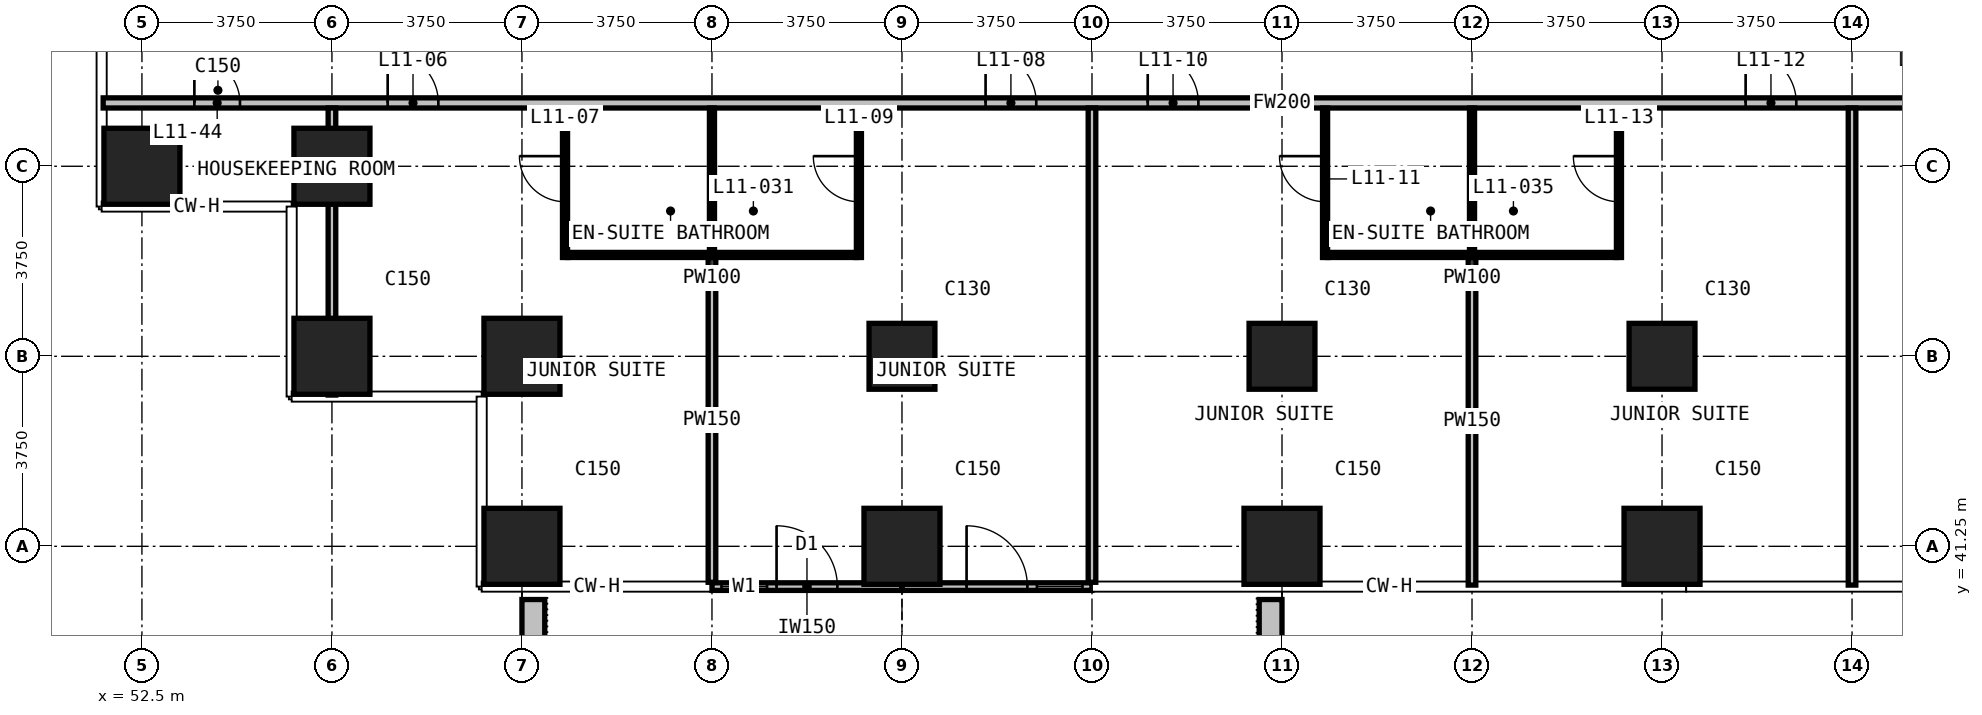
"""IFC4 building model, lengths in metres.
Left out: names, types, materials, properties, quantities, classifications, styles, units other than length and angle.
Written with IfcOpenShell. Run it as: python <this file> out.ifc"""

import sys

from ifc_helpers import new_model, si_unit, direction, frame, frame_2d, origin, origin_2d, place, context, subcontext, project, spatial, rectangle, extrude, element, fill, save


model = new_model("IFC4")
c1 = context("Model", 3, precision=1e-05, world=origin(), true_north=direction((0.0, 1.0)))
c2 = subcontext(c1, "Body", "Model", "MODEL_VIEW")
j1 = project(units=[si_unit("LENGTHUNIT", "METRE"), si_unit("PLANEANGLEUNIT", "RADIAN")], contexts=[c1])
p1 = place(None, origin())
s1 = spatial("IfcSite", under=j1, at=p1, CompositionType="ELEMENT")
p2 = place(p1, origin())
s2 = spatial("IfcBuilding", under=s1, at=p2, CompositionType="ELEMENT")
p3 = place(p2, frame((0.0, 0.0, 56.0)))
s3 = spatial("IfcBuildingStorey", under=s2, at=p3, CompositionType="ELEMENT", Elevation=56.0)
for number, where, z_axis, x_axis in (
    (1, (52.5, 48.75, 0.0), (0.0, 0.0, 1.0), (1.0, 0.0, 0.0)),
    (2, (56.25, 45.0, 0.0), (0.0, 0.0, 1.0), (1.0, 0.0, 0.0)),
    (3, (56.25, 48.75, 0.0), (0.0, 0.0, 1.0), (1.0, 0.0, 0.0)),
    (4, (60.0, 41.25, 0.0), (0.0, 0.0, 1.0), (1.0, 0.0, 0.0)),
    (5, (60.0, 45.0, 0.0), (0.0, 0.0, 1.0), (1.0, 0.0, 0.0)),
    (6, (67.5, 41.25, 0.0), (0.0, 0.0, 1.0), (1.0, 0.0, 0.0)),
):
    element("IfcColumn", number, at=place(p3, frame(where, z_axis=z_axis, x_axis=x_axis)), inside=s3, PredefinedType="COLUMN", context=c2, shape_type="SweptSolid", body=[
        extrude(rectangle(XDim=1.5, YDim=1.5, at=origin_2d()), origin(), (0.0, 0.0, 1.0), 3.3),
    ])
p4 = place(p3, frame((67.5, 45.0, 0.0), z_axis=(0.0, 0.0, 1.0), x_axis=(1.0, 0.0, 0.0)))
e7 = element("IfcColumn", 7, at=p4, inside=s3, PredefinedType="COLUMN", context=c2, shape_type="SweptSolid", body=[
    extrude(rectangle(XDim=1.3, YDim=1.3, at=origin_2d()), origin(), (0.0, 0.0, 1.0), 3.3),
])
p5 = place(p3, frame((75.0, 41.25, 0.0), z_axis=(0.0, 0.0, 1.0), x_axis=(1.0, 0.0, 0.0)))
e8 = element("IfcColumn", 8, at=p5, inside=s3, PredefinedType="COLUMN", context=c2, shape_type="SweptSolid", body=[
    extrude(rectangle(XDim=1.5, YDim=1.5, at=origin_2d()), origin(), (0.0, 0.0, 1.0), 3.3),
])
p6 = place(p3, frame((75.0, 45.0, 0.0), z_axis=(0.0, 0.0, 1.0), x_axis=(1.0, 0.0, 0.0)))
e9 = element("IfcColumn", 9, at=p6, inside=s3, PredefinedType="COLUMN", context=c2, shape_type="SweptSolid", body=[
    extrude(rectangle(XDim=1.3, YDim=1.3, at=origin_2d()), origin(), (0.0, 0.0, 1.0), 3.3),
])
p7 = place(p3, frame((82.5, 41.25, 0.0), z_axis=(0.0, 0.0, 1.0), x_axis=(1.0, 0.0, 0.0)))
e10 = element("IfcColumn", 10, at=p7, inside=s3, PredefinedType="COLUMN", context=c2, shape_type="SweptSolid", body=[
    extrude(rectangle(XDim=1.5, YDim=1.5, at=origin_2d()), origin(), (0.0, 0.0, 1.0), 3.3),
])
p8 = place(p3, frame((82.5, 45.0, 0.0), z_axis=(0.0, 0.0, 1.0), x_axis=(1.0, 0.0, 0.0)))
e11 = element("IfcColumn", 11, at=p8, inside=s3, PredefinedType="COLUMN", context=c2, shape_type="SweptSolid", body=[
    extrude(rectangle(XDim=1.3, YDim=1.3, at=origin_2d()), origin(), (0.0, 0.0, 1.0), 3.3),
])
p9 = place(p3, frame((63.75, 40.455, 0.0), z_axis=(0.0, 0.0, 1.0), x_axis=(1.0, 0.0, 0.0)))
e12 = element("IfcWall", 12, at=p9, inside=s3, PredefinedType="SOLIDWALL", context=c2, shape_type="SweptSolid", body=[
    extrude(rectangle(XDim=3.75, YDim=0.15, at=frame_2d((1.875, 0.0))), origin(), (0.0, 0.0, 1.0), 3.0),
])
p10 = place(p9, frame((0.188, 0.0, 0.1)))
e13 = element("IfcOpeningElement", 13, at=p10, cuts=e12, PredefinedType="OPENING", context=c2, shape_type="SweptSolid", body=[
    extrude(rectangle(XDim=0.9, YDim=2.4, at=frame_2d((0.45, 1.2))), frame((0.0, 0.085, 0.0), z_axis=(0.0, -1.0, 0.0), x_axis=(1.0, 0.0, 0.0)), (0.0, 0.0, 1.0), 0.17),
])
p11 = place(p9, frame((1.275, 0.0, 0.0)))
e14 = element("IfcOpeningElement", 14, at=p11, cuts=e12, PredefinedType="OPENING", context=c2, shape_type="SweptSolid", body=[
    extrude(rectangle(XDim=1.2, YDim=2.4, at=frame_2d((0.6, 1.2))), frame((0.0, 0.085, 0.0), z_axis=(0.0, -1.0, 0.0), x_axis=(1.0, 0.0, 0.0)), (0.0, 0.0, 1.0), 0.17),
])
p12 = place(p3, frame((67.5, 40.455, 0.0), z_axis=(0.0, 0.0, 1.0), x_axis=(1.0, 0.0, 0.0)))
e15 = element("IfcWall", 15, at=p12, inside=s3, PredefinedType="SOLIDWALL", context=c2, shape_type="SweptSolid", body=[
    extrude(rectangle(XDim=3.75, YDim=0.15, at=frame_2d((1.875, 0.0))), origin(), (0.0, 0.0, 1.0), 3.0),
])
p13 = place(p12, frame((1.275, 0.0, 0.0)))
e16 = element("IfcOpeningElement", 16, at=p13, cuts=e15, PredefinedType="OPENING", context=c2, shape_type="SweptSolid", body=[
    extrude(rectangle(XDim=1.2, YDim=2.4, at=frame_2d((0.6, 1.2))), frame((0.0, 0.085, 0.0), z_axis=(0.0, -1.0, 0.0), x_axis=(1.0, 0.0, 0.0)), (0.0, 0.0, 1.0), 0.17),
])
p14 = place(p12, frame((2.663, 0.0, 0.1)))
e17 = element("IfcOpeningElement", 17, at=p14, cuts=e15, PredefinedType="OPENING", context=c2, shape_type="SweptSolid", body=[
    extrude(rectangle(XDim=0.9, YDim=2.4, at=frame_2d((0.45, 1.2))), frame((0.0, 0.085, 0.0), z_axis=(0.0, -1.0, 0.0), x_axis=(1.0, 0.0, 0.0)), (0.0, 0.0, 1.0), 0.17),
])
for number, where, z_axis, x_axis in (
    (18, (60.225, 40.2, 0.0), (0.0, 0.0, 1.0), (0.0, -1.0, 0.0)),
    (19, (74.775, 40.2, 0.0), (0.0, 0.0, 1.0), (0.0, -1.0, 0.0)),
):
    element("IfcWall", number, at=place(p3, frame(where, z_axis=z_axis, x_axis=x_axis)), inside=s3, PredefinedType="USERDEFINED", context=c2, shape_type="SweptSolid", body=[
        extrude(rectangle(XDim=2.35, YDim=0.45, at=frame_2d((1.175, 0.0))), origin(), (0.0, 0.0, 1.0), 1.1),
    ])
p15 = place(p3, frame((51.735, 50.0, 0.0), z_axis=(0.0, 0.0, 1.0), x_axis=(1.0, 0.0, 0.0)))
e20 = element("IfcWall", 20, at=p15, inside=s3, PredefinedType="PARTITIONING", context=c2, shape_type="SweptSolid", body=[
    extrude(rectangle(XDim=46.53, YDim=0.2, at=frame_2d((23.265, 0.0))), origin(), (0.0, 0.0, 1.0), 3.0),
])
p16 = place(p15, frame((5.615, 0.0, 0.0)))
e21 = element("IfcOpeningElement", 21, at=p16, cuts=e20, PredefinedType="OPENING", context=c2, shape_type="SweptSolid", body=[
    extrude(rectangle(XDim=1.0, YDim=2.2, at=frame_2d((0.5, 1.1))), frame((0.0, 0.11, 0.0), z_axis=(0.0, -1.0, 0.0), x_axis=(1.0, 0.0, 0.0)), (0.0, 0.0, 1.0), 0.22),
])
p17 = place(p15, frame((17.415, 0.0, 0.0)))
e22 = element("IfcOpeningElement", 22, at=p17, cuts=e20, PredefinedType="OPENING", context=c2, shape_type="SweptSolid", body=[
    extrude(rectangle(XDim=1.0, YDim=2.2, at=frame_2d((0.5, 1.1))), frame((0.0, 0.11, 0.0), z_axis=(0.0, -1.0, 0.0), x_axis=(1.0, 0.0, 0.0)), (0.0, 0.0, 1.0), 0.22),
])
p18 = place(p15, frame((20.615, 0.0, 0.0)))
e23 = element("IfcOpeningElement", 23, at=p18, cuts=e20, PredefinedType="OPENING", context=c2, shape_type="SweptSolid", body=[
    extrude(rectangle(XDim=1.0, YDim=2.2, at=frame_2d((0.5, 1.1))), frame((0.0, 0.11, 0.0), z_axis=(0.0, -1.0, 0.0), x_axis=(1.0, 0.0, 0.0)), (0.0, 0.0, 1.0), 0.22),
])
p19 = place(p15, frame((32.415, 0.0, 0.0)))
e24 = element("IfcOpeningElement", 24, at=p19, cuts=e20, PredefinedType="OPENING", context=c2, shape_type="SweptSolid", body=[
    extrude(rectangle(XDim=1.0, YDim=2.2, at=frame_2d((0.5, 1.1))), frame((0.0, 0.11, 0.0), z_axis=(0.0, -1.0, 0.0), x_axis=(1.0, 0.0, 0.0)), (0.0, 0.0, 1.0), 0.22),
])
p20 = place(p15, frame((35.615, 0.0, 0.0)))
e25 = element("IfcOpeningElement", 25, at=p20, cuts=e20, PredefinedType="OPENING", context=c2, shape_type="SweptSolid", body=[
    extrude(rectangle(XDim=1.0, YDim=2.2, at=frame_2d((0.5, 1.1))), frame((0.0, 0.11, 0.0), z_axis=(0.0, -1.0, 0.0), x_axis=(1.0, 0.0, 0.0)), (0.0, 0.0, 1.0), 0.22),
])
p21 = place(p15, frame((1.8, 0.0, 0.0)))
e26 = element("IfcOpeningElement", 26, at=p21, cuts=e20, PredefinedType="OPENING", context=c2, shape_type="SweptSolid", body=[
    extrude(rectangle(XDim=0.9, YDim=2.2, at=frame_2d((0.45, 1.1))), frame((0.0, 0.11, 0.0), z_axis=(0.0, -1.0, 0.0), x_axis=(1.0, 0.0, 0.0)), (0.0, 0.0, 1.0), 0.22),
])
p22 = place(p15, frame((43.815, 0.0, 0.0)))
e27 = element("IfcOpeningElement", 27, at=p22, cuts=e20, PredefinedType="OPENING", context=c2, shape_type="SweptSolid", body=[
    extrude(rectangle(XDim=0.9, YDim=2.2, at=frame_2d((0.45, 1.1))), frame((0.0, 0.11, 0.0), z_axis=(0.0, -1.0, 0.0), x_axis=(1.0, 0.0, 0.0)), (0.0, 0.0, 1.0), 0.22),
])
p23 = place(p3, frame((56.25, 44.235, 0.0), z_axis=(0.0, 0.0, 1.0), x_axis=(0.0, 1.0, 0.0)))
e28 = element("IfcWall", 28, at=p23, inside=s3, PredefinedType="PARTITIONING", context=c2, shape_type="SweptSolid", body=[
    extrude(rectangle(XDim=5.665, YDim=0.15, at=frame_2d((2.833, 0.0))), origin(), (0.0, 0.0, 1.0), 3.0),
])
p24 = place(p3, frame((63.75, 40.54, 0.0), z_axis=(0.0, 0.0, 1.0), x_axis=(0.0, 1.0, 0.0)))
e29 = element("IfcWall", 29, at=p24, inside=s3, PredefinedType="PARTITIONING", context=c2, shape_type="SweptSolid", body=[
    extrude(rectangle(XDim=6.41, YDim=0.15, at=frame_2d((3.205, 0.0))), origin(), (0.0, 0.0, 1.0), 3.0),
])
p25 = place(p3, frame((71.25, 40.54, 0.0), z_axis=(0.0, 0.0, 1.0), x_axis=(0.0, 1.0, 0.0)))
e30 = element("IfcWall", 30, at=p25, inside=s3, PredefinedType="PARTITIONING", context=c2, shape_type="SweptSolid", body=[
    extrude(rectangle(XDim=9.36, YDim=0.15, at=frame_2d((4.68, 0.0))), origin(), (0.0, 0.0, 1.0), 3.0),
])
p26 = place(p3, frame((78.75, 40.485, 0.0), z_axis=(0.0, 0.0, 1.0), x_axis=(0.0, 1.0, 0.0)))
e31 = element("IfcWall", 31, at=p26, inside=s3, PredefinedType="PARTITIONING", context=c2, shape_type="SweptSolid", body=[
    extrude(rectangle(XDim=6.465, YDim=0.15, at=frame_2d((3.232, 0.0))), origin(), (0.0, 0.0, 1.0), 3.0),
])
p27 = place(p3, frame((86.25, 40.485, 0.0), z_axis=(0.0, 0.0, 1.0), x_axis=(0.0, 1.0, 0.0)))
e32 = element("IfcWall", 32, at=p27, inside=s3, PredefinedType="PARTITIONING", context=c2, shape_type="SweptSolid", body=[
    extrude(rectangle(XDim=9.415, YDim=0.15, at=frame_2d((4.708, 0.0))), origin(), (0.0, 0.0, 1.0), 3.0),
])
for number, where, z_axis, x_axis in (
    (33, (60.9, 47.0, 0.0), (0.0, 0.0, 1.0), (1.0, 0.0, 0.0)),
    (34, (75.9, 47.0, 0.0), (0.0, 0.0, 1.0), (1.0, 0.0, 0.0)),
):
    element("IfcWall", number, at=place(p3, frame(where, z_axis=z_axis, x_axis=x_axis)), inside=s3, PredefinedType="PARTITIONING", context=c2, shape_type="SweptSolid", body=[
        extrude(rectangle(XDim=5.7, YDim=0.1, at=frame_2d((2.85, 0.0))), origin(), (0.0, 0.0, 1.0), 3.0),
    ])
p28 = place(p3, frame((60.85, 46.95, 0.0), z_axis=(0.0, 0.0, 1.0), x_axis=(0.0, 1.0, 0.0)))
e35 = element("IfcWall", 35, at=p28, inside=s3, PredefinedType="PARTITIONING", context=c2, shape_type="SweptSolid", body=[
    extrude(rectangle(XDim=2.95, YDim=0.1, at=frame_2d((1.475, 0.0))), origin(), (0.0, 0.0, 1.0), 3.0),
])
p29 = place(p28, frame((1.1, 0.0, 0.0)))
e36 = element("IfcOpeningElement", 36, at=p29, cuts=e35, PredefinedType="OPENING", context=c2, shape_type="SweptSolid", body=[
    extrude(rectangle(XDim=0.9, YDim=2.2, at=frame_2d((0.45, 1.1))), frame((0.0, 0.06, 0.0), z_axis=(0.0, -1.0, 0.0), x_axis=(1.0, 0.0, 0.0)), (0.0, 0.0, 1.0), 0.12),
])
p30 = place(p3, frame((63.75, 47.05, 0.0), z_axis=(0.0, 0.0, 1.0), x_axis=(0.0, 1.0, 0.0)))
e37 = element("IfcWall", 37, at=p30, inside=s3, PredefinedType="PARTITIONING", context=c2, shape_type="SweptSolid", body=[
    extrude(rectangle(XDim=2.85, YDim=0.1, at=frame_2d((1.425, 0.0))), origin(), (0.0, 0.0, 1.0), 3.0),
])
p31 = place(p3, frame((66.65, 46.95, 0.0), z_axis=(0.0, 0.0, 1.0), x_axis=(0.0, 1.0, 0.0)))
e38 = element("IfcWall", 38, at=p31, inside=s3, PredefinedType="PARTITIONING", context=c2, shape_type="SweptSolid", body=[
    extrude(rectangle(XDim=2.95, YDim=0.1, at=frame_2d((1.475, 0.0))), origin(), (0.0, 0.0, 1.0), 3.0),
])
p32 = place(p31, frame((1.1, 0.0, 0.0)))
e39 = element("IfcOpeningElement", 39, at=p32, cuts=e38, PredefinedType="OPENING", context=c2, shape_type="SweptSolid", body=[
    extrude(rectangle(XDim=0.9, YDim=2.2, at=frame_2d((0.45, 1.1))), frame((0.0, 0.06, 0.0), z_axis=(0.0, -1.0, 0.0), x_axis=(1.0, 0.0, 0.0)), (0.0, 0.0, 1.0), 0.12),
])
p33 = place(p3, frame((75.85, 46.95, 0.0), z_axis=(0.0, 0.0, 1.0), x_axis=(0.0, 1.0, 0.0)))
e40 = element("IfcWall", 40, at=p33, inside=s3, PredefinedType="PARTITIONING", context=c2, shape_type="SweptSolid", body=[
    extrude(rectangle(XDim=2.95, YDim=0.1, at=frame_2d((1.475, 0.0))), origin(), (0.0, 0.0, 1.0), 3.0),
])
p34 = place(p33, frame((1.1, 0.0, 0.0)))
e41 = element("IfcOpeningElement", 41, at=p34, cuts=e40, PredefinedType="OPENING", context=c2, shape_type="SweptSolid", body=[
    extrude(rectangle(XDim=0.9, YDim=2.2, at=frame_2d((0.45, 1.1))), frame((0.0, 0.06, 0.0), z_axis=(0.0, -1.0, 0.0), x_axis=(1.0, 0.0, 0.0)), (0.0, 0.0, 1.0), 0.12),
])
p35 = place(p3, frame((78.75, 47.05, 0.0), z_axis=(0.0, 0.0, 1.0), x_axis=(0.0, 1.0, 0.0)))
e42 = element("IfcWall", 42, at=p35, inside=s3, PredefinedType="PARTITIONING", context=c2, shape_type="SweptSolid", body=[
    extrude(rectangle(XDim=2.85, YDim=0.1, at=frame_2d((1.425, 0.0))), origin(), (0.0, 0.0, 1.0), 3.0),
])
p36 = place(p3, frame((81.65, 46.95, 0.0), z_axis=(0.0, 0.0, 1.0), x_axis=(0.0, 1.0, 0.0)))
e43 = element("IfcWall", 43, at=p36, inside=s3, PredefinedType="PARTITIONING", context=c2, shape_type="SweptSolid", body=[
    extrude(rectangle(XDim=2.95, YDim=0.1, at=frame_2d((1.475, 0.0))), origin(), (0.0, 0.0, 1.0), 3.0),
])
p37 = place(p36, frame((1.1, 0.0, 0.0)))
e44 = element("IfcOpeningElement", 44, at=p37, cuts=e43, PredefinedType="OPENING", context=c2, shape_type="SweptSolid", body=[
    extrude(rectangle(XDim=0.9, YDim=2.2, at=frame_2d((0.45, 1.1))), frame((0.0, 0.06, 0.0), z_axis=(0.0, -1.0, 0.0), x_axis=(1.0, 0.0, 0.0)), (0.0, 0.0, 1.0), 0.12),
])
p38 = place(p10, origin())
e45 = element("IfcWindow", 45, at=p38, inside=s3, PartitioningType="SINGLE_PANEL", PredefinedType="WINDOW", context=c2, shape_type="SweptSolid", body=[
    extrude(rectangle(XDim=0.9, YDim=2.4, at=frame_2d((0.45, 1.2))), frame((0.0, 0.03, 0.0), z_axis=(0.0, -1.0, 0.0), x_axis=(1.0, 0.0, 0.0)), (0.0, 0.0, 1.0), 0.06),
])
fill(e13, e45)
p39 = place(p11, origin())
e46 = element("IfcDoor", 46, at=p39, inside=s3, OperationType="SINGLE_SWING_LEFT", PredefinedType="DOOR", context=c2, shape_type="SweptSolid", body=[
    extrude(rectangle(XDim=1.2, YDim=2.4, at=frame_2d((0.6, 1.2))), frame((0.0, 0.025, 0.0), z_axis=(0.0, -1.0, 0.0), x_axis=(1.0, 0.0, 0.0)), (0.0, 0.0, 1.0), 0.05),
])
fill(e14, e46)
p40 = place(p13, origin())
e47 = element("IfcDoor", 47, at=p40, inside=s3, OperationType="SINGLE_SWING_LEFT", PredefinedType="DOOR", context=c2, shape_type="SweptSolid", body=[
    extrude(rectangle(XDim=1.2, YDim=2.4, at=frame_2d((0.6, 1.2))), frame((0.0, 0.025, 0.0), z_axis=(0.0, -1.0, 0.0), x_axis=(1.0, 0.0, 0.0)), (0.0, 0.0, 1.0), 0.05),
])
fill(e16, e47)
p41 = place(p14, origin())
e48 = element("IfcWindow", 48, at=p41, inside=s3, PartitioningType="SINGLE_PANEL", PredefinedType="WINDOW", context=c2, shape_type="SweptSolid", body=[
    extrude(rectangle(XDim=0.9, YDim=2.4, at=frame_2d((0.45, 1.2))), frame((0.0, 0.03, 0.0), z_axis=(0.0, -1.0, 0.0), x_axis=(1.0, 0.0, 0.0)), (0.0, 0.0, 1.0), 0.06),
])
fill(e17, e48)
p42 = place(p16, origin())
e49 = element("IfcDoor", 49, at=p42, inside=s3, OperationType="SINGLE_SWING_LEFT", PredefinedType="DOOR", context=c2, shape_type="SweptSolid", body=[
    extrude(rectangle(XDim=1.0, YDim=2.2, at=frame_2d((0.5, 1.1))), frame((0.0, 0.025, 0.0), z_axis=(0.0, -1.0, 0.0), x_axis=(1.0, 0.0, 0.0)), (0.0, 0.0, 1.0), 0.05),
])
fill(e21, e49)
p43 = place(p29, origin())
e50 = element("IfcDoor", 50, at=p43, inside=s3, OperationType="SINGLE_SWING_RIGHT", PredefinedType="DOOR", context=c2, shape_type="SweptSolid", body=[
    extrude(rectangle(XDim=0.9, YDim=2.2, at=frame_2d((0.45, 1.1))), frame((0.0, 0.025, 0.0), z_axis=(0.0, -1.0, 0.0), x_axis=(1.0, 0.0, 0.0)), (0.0, 0.0, 1.0), 0.05),
])
fill(e36, e50)
p44 = place(p17, origin())
e51 = element("IfcDoor", 51, at=p44, inside=s3, OperationType="SINGLE_SWING_LEFT", PredefinedType="DOOR", context=c2, shape_type="SweptSolid", body=[
    extrude(rectangle(XDim=1.0, YDim=2.2, at=frame_2d((0.5, 1.1))), frame((0.0, 0.025, 0.0), z_axis=(0.0, -1.0, 0.0), x_axis=(1.0, 0.0, 0.0)), (0.0, 0.0, 1.0), 0.05),
])
fill(e22, e51)
p45 = place(p32, origin())
e52 = element("IfcDoor", 52, at=p45, inside=s3, OperationType="SINGLE_SWING_RIGHT", PredefinedType="DOOR", context=c2, shape_type="SweptSolid", body=[
    extrude(rectangle(XDim=0.9, YDim=2.2, at=frame_2d((0.45, 1.1))), frame((0.0, 0.025, 0.0), z_axis=(0.0, -1.0, 0.0), x_axis=(1.0, 0.0, 0.0)), (0.0, 0.0, 1.0), 0.05),
])
fill(e39, e52)
p46 = place(p18, origin())
e53 = element("IfcDoor", 53, at=p46, inside=s3, OperationType="SINGLE_SWING_RIGHT", PredefinedType="DOOR", context=c2, shape_type="SweptSolid", body=[
    extrude(rectangle(XDim=1.0, YDim=2.2, at=frame_2d((0.5, 1.1))), frame((0.0, 0.025, 0.0), z_axis=(0.0, -1.0, 0.0), x_axis=(1.0, 0.0, 0.0)), (0.0, 0.0, 1.0), 0.05),
])
fill(e23, e53)
p47 = place(p34, origin())
e54 = element("IfcDoor", 54, at=p47, inside=s3, OperationType="SINGLE_SWING_RIGHT", PredefinedType="DOOR", context=c2, shape_type="SweptSolid", body=[
    extrude(rectangle(XDim=0.9, YDim=2.2, at=frame_2d((0.45, 1.1))), frame((0.0, 0.025, 0.0), z_axis=(0.0, -1.0, 0.0), x_axis=(1.0, 0.0, 0.0)), (0.0, 0.0, 1.0), 0.05),
])
fill(e41, e54)
p48 = place(p19, origin())
e55 = element("IfcDoor", 55, at=p48, inside=s3, OperationType="SINGLE_SWING_LEFT", PredefinedType="DOOR", context=c2, shape_type="SweptSolid", body=[
    extrude(rectangle(XDim=1.0, YDim=2.2, at=frame_2d((0.5, 1.1))), frame((0.0, 0.025, 0.0), z_axis=(0.0, -1.0, 0.0), x_axis=(1.0, 0.0, 0.0)), (0.0, 0.0, 1.0), 0.05),
])
fill(e24, e55)
p49 = place(p37, origin())
e56 = element("IfcDoor", 56, at=p49, inside=s3, OperationType="SINGLE_SWING_RIGHT", PredefinedType="DOOR", context=c2, shape_type="SweptSolid", body=[
    extrude(rectangle(XDim=0.9, YDim=2.2, at=frame_2d((0.45, 1.1))), frame((0.0, 0.025, 0.0), z_axis=(0.0, -1.0, 0.0), x_axis=(1.0, 0.0, 0.0)), (0.0, 0.0, 1.0), 0.05),
])
fill(e44, e56)
p50 = place(p21, origin())
e57 = element("IfcDoor", 57, at=p50, inside=s3, OperationType="SINGLE_SWING_RIGHT", PredefinedType="DOOR", context=c2, shape_type="SweptSolid", body=[
    extrude(rectangle(XDim=0.9, YDim=2.2, at=frame_2d((0.45, 1.1))), frame((0.0, 0.025, 0.0), z_axis=(0.0, -1.0, 0.0), x_axis=(1.0, 0.0, 0.0)), (0.0, 0.0, 1.0), 0.05),
])
fill(e26, e57)
save(model, sys.argv[1])
